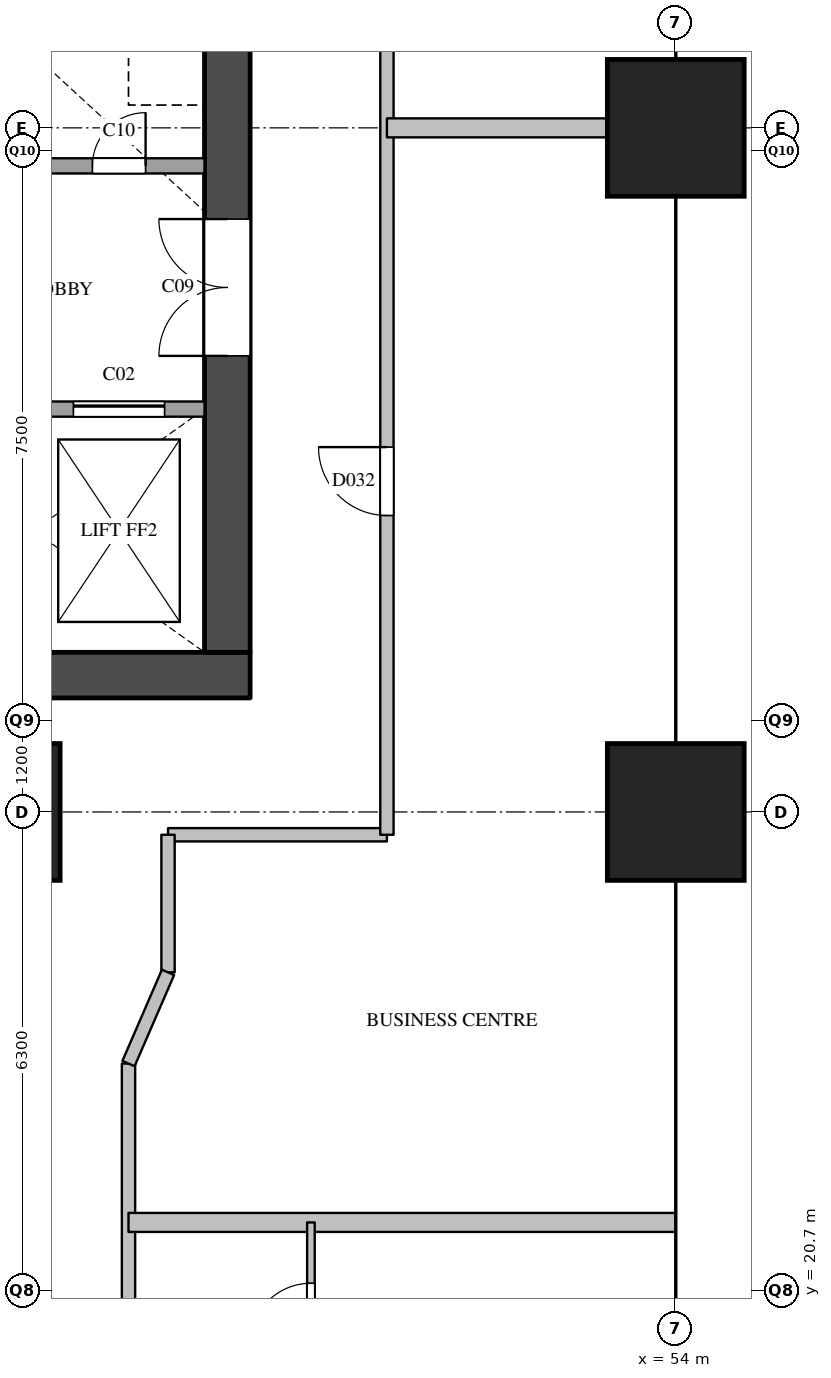
"""IFC4 building model, lengths in metres.
Left out: names, types, materials, properties, quantities, classifications, styles, units other than length and angle.
Written with IfcOpenShell. Run it as: python <this file> out.ifc"""

import sys

from ifc_helpers import new_model, si_unit, direction, frame, frame_2d, origin, origin_2d, place, context, subcontext, project, spatial, rectangle, extrude, element, fill, save


model = new_model("IFC4")
c1 = context("Model", 3, precision=1e-05, world=origin(), true_north=direction((0.0, 1.0)))
c2 = subcontext(c1, "Body", "Model", "MODEL_VIEW")
j1 = project(units=[si_unit("LENGTHUNIT", "METRE"), si_unit("PLANEANGLEUNIT", "RADIAN")], contexts=[c1])
p1 = place(None, origin())
s1 = spatial("IfcSite", under=j1, at=p1, CompositionType="ELEMENT")
p2 = place(p1, origin())
s2 = spatial("IfcBuilding", under=s1, at=p2, CompositionType="ELEMENT")
p3 = place(p2, frame((0.0, 0.0, 57.6)))
s3 = spatial("IfcBuildingStorey", under=s2, at=p3, CompositionType="ELEMENT", Elevation=57.6)
for number, where, z_axis, x_axis in (
    (1, (45.0, 27.0, 0.0), (0.0, 0.0, 1.0), (1.0, 0.0, 0.0)),
    (2, (54.0, 27.0, 0.0), (0.0, 0.0, 1.0), (1.0, 0.0, 0.0)),
    (3, (54.0, 36.0, 0.0), (0.0, 0.0, 1.0), (1.0, 0.0, 0.0)),
):
    element("IfcColumn", number, at=place(p3, frame(where, z_axis=z_axis, x_axis=x_axis)), inside=s3, PredefinedType="COLUMN", context=c2, shape_type="SweptSolid", body=[
        extrude(rectangle(XDim=1.8, YDim=1.8, at=origin_2d()), origin(), (0.0, 0.0, 1.0), 3.8),
    ])
p4 = place(p3, frame((36.0, 28.8, 0.0), z_axis=(0.0, 0.0, 1.0), x_axis=(1.0, 0.0, 0.0)))
e4 = element("IfcWall", 4, at=p4, inside=s3, PredefinedType="SHEAR", context=c2, shape_type="SweptSolid", body=[
    extrude(rectangle(XDim=12.4, YDim=0.6, at=frame_2d((6.2, 0.0))), origin(), (0.0, 0.0, 1.0), 3.5),
])
p5 = place(p3, frame((48.1, 29.1, 0.0), z_axis=(0.0, 0.0, 1.0), x_axis=(0.0, 1.0, 0.0)))
e5 = element("IfcWall", 5, at=p5, inside=s3, PredefinedType="SHEAR", context=c2, shape_type="SweptSolid", body=[
    extrude(rectangle(XDim=20.3, YDim=0.6, at=frame_2d((10.15, 0.0))), origin(), (0.0, 0.0, 1.0), 3.5),
])
p6 = place(p5, frame((12.5, 0.0, 0.0)))
e6 = element("IfcOpeningElement", 6, at=p6, cuts=e5, PredefinedType="OPENING", context=c2, shape_type="SweptSolid", body=[
    extrude(rectangle(XDim=0.7, YDim=2.1, at=frame_2d((0.35, 1.05))), frame((0.0, 0.31, 0.0), z_axis=(0.0, -1.0, 0.0), x_axis=(1.0, 0.0, 0.0)), (0.0, 0.0, 1.0), 0.62),
])
p7 = place(p5, frame((3.9, 0.0, 0.0)))
e7 = element("IfcOpeningElement", 7, at=p7, cuts=e5, PredefinedType="OPENING", context=c2, shape_type="SweptSolid", body=[
    extrude(rectangle(XDim=1.8, YDim=2.1, at=frame_2d((0.9, 1.05))), frame((0.0, 0.31, 0.0), z_axis=(0.0, -1.0, 0.0), x_axis=(1.0, 0.0, 0.0)), (0.0, 0.0, 1.0), 0.62),
])
p8 = place(p3, frame((36.6, 32.3, 0.0), z_axis=(0.0, 0.0, 1.0), x_axis=(1.0, 0.0, 0.0)))
e8 = element("IfcWall", 8, at=p8, inside=s3, PredefinedType="SOLIDWALL", context=c2, shape_type="SweptSolid", body=[
    extrude(rectangle(XDim=11.2, YDim=0.2, at=frame_2d((5.6, 0.0))), origin(), (0.0, 0.0, 1.0), 3.5),
])
p9 = place(p8, frame((7.225, 0.0, 0.0)))
e9 = element("IfcOpeningElement", 9, at=p9, cuts=e8, PredefinedType="OPENING", context=c2, shape_type="SweptSolid", body=[
    extrude(rectangle(XDim=1.2, YDim=2.1, at=frame_2d((0.6, 1.05))), frame((0.0, 0.11, 0.0), z_axis=(0.0, -1.0, 0.0), x_axis=(1.0, 0.0, 0.0)), (0.0, 0.0, 1.0), 0.22),
])
p10 = place(p8, frame((9.475, 0.0, 0.0)))
e10 = element("IfcOpeningElement", 10, at=p10, cuts=e8, PredefinedType="OPENING", context=c2, shape_type="SweptSolid", body=[
    extrude(rectangle(XDim=1.2, YDim=2.1, at=frame_2d((0.6, 1.05))), frame((0.0, 0.11, 0.0), z_axis=(0.0, -1.0, 0.0), x_axis=(1.0, 0.0, 0.0)), (0.0, 0.0, 1.0), 0.22),
])
p11 = place(p3, frame((43.3, 35.5, 0.0), z_axis=(0.0, 0.0, 1.0), x_axis=(1.0, 0.0, 0.0)))
e11 = element("IfcWall", 11, at=p11, inside=s3, PredefinedType="SOLIDWALL", context=c2, shape_type="SweptSolid", body=[
    extrude(rectangle(XDim=4.5, YDim=0.2, at=frame_2d((2.25, 0.0))), origin(), (0.0, 0.0, 1.0), 3.5),
])
p12 = place(p11, frame((0.525, 0.0, 0.0)))
e12 = element("IfcOpeningElement", 12, at=p12, cuts=e11, PredefinedType="OPENING", context=c2, shape_type="SweptSolid", body=[
    extrude(rectangle(XDim=1.2, YDim=2.1, at=frame_2d((0.6, 1.05))), frame((0.0, 0.11, 0.0), z_axis=(0.0, -1.0, 0.0), x_axis=(1.0, 0.0, 0.0)), (0.0, 0.0, 1.0), 0.22),
])
p13 = place(p11, frame((3.025, 0.0, 0.0)))
e13 = element("IfcOpeningElement", 13, at=p13, cuts=e11, PredefinedType="OPENING", context=c2, shape_type="SweptSolid", body=[
    extrude(rectangle(XDim=0.7, YDim=2.1, at=frame_2d((0.35, 1.05))), frame((0.0, 0.11, 0.0), z_axis=(0.0, -1.0, 0.0), x_axis=(1.0, 0.0, 0.0)), (0.0, 0.0, 1.0), 0.22),
])
p14 = place(p3, frame((47.32, 26.7, 0.0), z_axis=(0.0, 0.0, 1.0), x_axis=(1.0, 0.0, 0.0)))
e14 = element("IfcWall", 14, at=p14, inside=s3, PredefinedType="PARTITIONING", context=c2, shape_type="SweptSolid", body=[
    extrude(rectangle(XDim=2.88, YDim=0.175, at=frame_2d((1.44, 0.0))), origin(), (0.0, 0.0, 1.0), 2.5),
])
p15 = place(p3, frame((46.8, 7.2, 0.0), z_axis=(0.0, 0.0, 1.0), x_axis=(0.0, 1.0, 0.0)))
e15 = element("IfcWall", 15, at=p15, inside=s3, PredefinedType="PARTITIONING", context=c2, shape_type="SweptSolid", body=[
    extrude(rectangle(XDim=16.49, YDim=0.175, at=frame_2d((8.245, 0.0))), origin(), (0.0, 0.0, 1.0), 3.5),
])
p16 = place(p15, frame((7.3, 0.0, 0.0)))
e16 = element("IfcOpeningElement", 16, at=p16, cuts=e15, PredefinedType="OPENING", context=c2, shape_type="SweptSolid", body=[
    extrude(rectangle(XDim=1.0, YDim=2.1, at=frame_2d((0.5, 1.05))), frame((0.0, 0.097, 0.0), z_axis=(0.0, -1.0, 0.0), x_axis=(1.0, 0.0, 0.0)), (0.0, 0.0, 1.0), 0.195),
])
p17 = place(p3, frame((47.32, 24.89, 0.0), z_axis=(0.0, 0.0, 1.0), x_axis=(0.0, 1.0, 0.0)))
e17 = element("IfcWall", 17, at=p17, inside=s3, PredefinedType="PARTITIONING", context=c2, shape_type="SweptSolid", body=[
    extrude(rectangle(XDim=1.81, YDim=0.175, at=frame_2d((0.905, 0.0))), origin(), (0.0, 0.0, 1.0), 2.5),
])
p18 = place(p3, frame((50.2, 26.7, 0.0), z_axis=(0.0, 0.0, 1.0), x_axis=(0.0, 1.0, 0.0)))
e18 = element("IfcWall", 18, at=p18, inside=s3, PredefinedType="PARTITIONING", context=c2, shape_type="SweptSolid", body=[
    extrude(rectangle(XDim=25.1, YDim=0.175, at=frame_2d((12.55, 0.0))), origin(), (0.0, 0.0, 1.0), 2.5),
])
p19 = place(p18, frame((4.2, 0.0, 0.0)))
e19 = element("IfcOpeningElement", 19, at=p19, cuts=e18, PredefinedType="OPENING", context=c2, shape_type="SweptSolid", body=[
    extrude(rectangle(XDim=0.9, YDim=2.1, at=frame_2d((0.45, 1.05))), frame((0.0, 0.097, 0.0), z_axis=(0.0, -1.0, 0.0), x_axis=(1.0, 0.0, 0.0)), (0.0, 0.0, 1.0), 0.195),
])
p20 = place(p18, frame((14.25, 0.0, 0.0)))
e20 = element("IfcOpeningElement", 20, at=p20, cuts=e18, PredefinedType="OPENING", context=c2, shape_type="SweptSolid", body=[
    extrude(rectangle(XDim=0.9, YDim=2.1, at=frame_2d((0.45, 1.05))), frame((0.0, 0.097, 0.0), z_axis=(0.0, -1.0, 0.0), x_axis=(1.0, 0.0, 0.0)), (0.0, 0.0, 1.0), 0.195),
])
p21 = place(p18, frame((22.15, 0.0, 0.0)))
e21 = element("IfcOpeningElement", 21, at=p21, cuts=e18, PredefinedType="OPENING", context=c2, shape_type="SweptSolid", body=[
    extrude(rectangle(XDim=0.9, YDim=2.1, at=frame_2d((0.45, 1.05))), frame((0.0, 0.097, 0.0), z_axis=(0.0, -1.0, 0.0), x_axis=(1.0, 0.0, 0.0)), (0.0, 0.0, 1.0), 0.195),
])
p22 = place(p3, frame((46.8, 21.6, 0.0), z_axis=(0.0, 0.0, 1.0), x_axis=(1.0, 0.0, 0.0)))
e22 = element("IfcWall", 22, at=p22, inside=s3, PredefinedType="PARTITIONING", context=c2, shape_type="SweptSolid", body=[
    extrude(rectangle(XDim=7.2, YDim=0.25, at=frame_2d((3.6, 0.0))), origin(), (0.0, 0.0, 1.0), 2.5),
])
p23 = place(p3, frame((50.2, 36.0, 0.0), z_axis=(0.0, 0.0, 1.0), x_axis=(1.0, 0.0, 0.0)))
e23 = element("IfcWall", 23, at=p23, inside=s3, PredefinedType="PARTITIONING", context=c2, shape_type="SweptSolid", body=[
    extrude(rectangle(XDim=3.8, YDim=0.25, at=frame_2d((1.9, 0.0))), origin(), (0.0, 0.0, 1.0), 3.5),
])
p24 = place(p3, frame((49.2, 19.2, 0.0), z_axis=(0.0, 0.0, 1.0), x_axis=(0.0, 1.0, 0.0)))
e24 = element("IfcWall", 24, at=p24, inside=s3, PredefinedType="PARTITIONING", context=c2, shape_type="SweptSolid", body=[
    extrude(rectangle(XDim=2.4, YDim=0.1, at=frame_2d((1.2, 0.0))), origin(), (0.0, 0.0, 1.0), 3.5),
])
p25 = place(p24, frame((0.8, 0.0, 0.0)))
e25 = element("IfcOpeningElement", 25, at=p25, cuts=e24, PredefinedType="OPENING", context=c2, shape_type="SweptSolid", body=[
    extrude(rectangle(XDim=0.8, YDim=2.1, at=frame_2d((0.4, 1.05))), frame((0.0, 0.06, 0.0), z_axis=(0.0, -1.0, 0.0), x_axis=(1.0, 0.0, 0.0)), (0.0, 0.0, 1.0), 0.12),
])
p26 = place(p3, frame((47.32, 24.89, 0.0), z_axis=(0.0, 0.0, 1.0), x_axis=(-0.397633632391, -0.917544273804, 0.0)))
e26 = element("IfcWall", 26, at=p26, inside=s3, PredefinedType="PARTITIONING", context=c2, shape_type="SweptSolid", body=[
    extrude(rectangle(XDim=1.308, YDim=0.175, at=frame_2d((0.654, 0.0))), origin(), (0.0, 0.0, 1.0), 3.5),
])
p27 = place(p10, origin())
e27 = element("IfcDoor", 27, at=p27, inside=s3, OperationType="SLIDING_TO_LEFT", PredefinedType="DOOR", context=c2, shape_type="SweptSolid", body=[
    extrude(rectangle(XDim=1.2, YDim=2.1, at=frame_2d((0.6, 1.05))), frame((0.0, 0.025, 0.0), z_axis=(0.0, -1.0, 0.0), x_axis=(1.0, 0.0, 0.0)), (0.0, 0.0, 1.0), 0.05),
])
fill(e10, e27)
p28 = place(p7, origin())
e28 = element("IfcDoor", 28, at=p28, inside=s3, OperationType="DOUBLE_DOOR_SINGLE_SWING", PredefinedType="DOOR", context=c2, shape_type="SweptSolid", body=[
    extrude(rectangle(XDim=1.8, YDim=2.1, at=frame_2d((0.9, 1.05))), frame((0.0, 0.025, 0.0), z_axis=(0.0, -1.0, 0.0), x_axis=(1.0, 0.0, 0.0)), (0.0, 0.0, 1.0), 0.05),
])
fill(e7, e28)
p29 = place(p13, origin())
e29 = element("IfcDoor", 29, at=p29, inside=s3, OperationType="SINGLE_SWING_RIGHT", PredefinedType="DOOR", context=c2, shape_type="SweptSolid", body=[
    extrude(rectangle(XDim=0.7, YDim=2.1, at=frame_2d((0.35, 1.05))), frame((0.0, 0.025, 0.0), z_axis=(0.0, -1.0, 0.0), x_axis=(1.0, 0.0, 0.0)), (0.0, 0.0, 1.0), 0.05),
])
fill(e13, e29)
p30 = place(p25, origin())
e30 = element("IfcDoor", 30, at=p30, inside=s3, OperationType="SINGLE_SWING_LEFT", PredefinedType="DOOR", context=c2, shape_type="SweptSolid", body=[
    extrude(rectangle(XDim=0.8, YDim=2.1, at=frame_2d((0.4, 1.05))), frame((0.0, 0.025, 0.0), z_axis=(0.0, -1.0, 0.0), x_axis=(1.0, 0.0, 0.0)), (0.0, 0.0, 1.0), 0.05),
])
fill(e25, e30)
p31 = place(p19, origin())
e31 = element("IfcDoor", 31, at=p31, inside=s3, OperationType="SINGLE_SWING_RIGHT", PredefinedType="DOOR", context=c2, shape_type="SweptSolid", body=[
    extrude(rectangle(XDim=0.9, YDim=2.1, at=frame_2d((0.45, 1.05))), frame((0.0, 0.025, 0.0), z_axis=(0.0, -1.0, 0.0), x_axis=(1.0, 0.0, 0.0)), (0.0, 0.0, 1.0), 0.05),
])
fill(e19, e31)
save(model, sys.argv[1])
